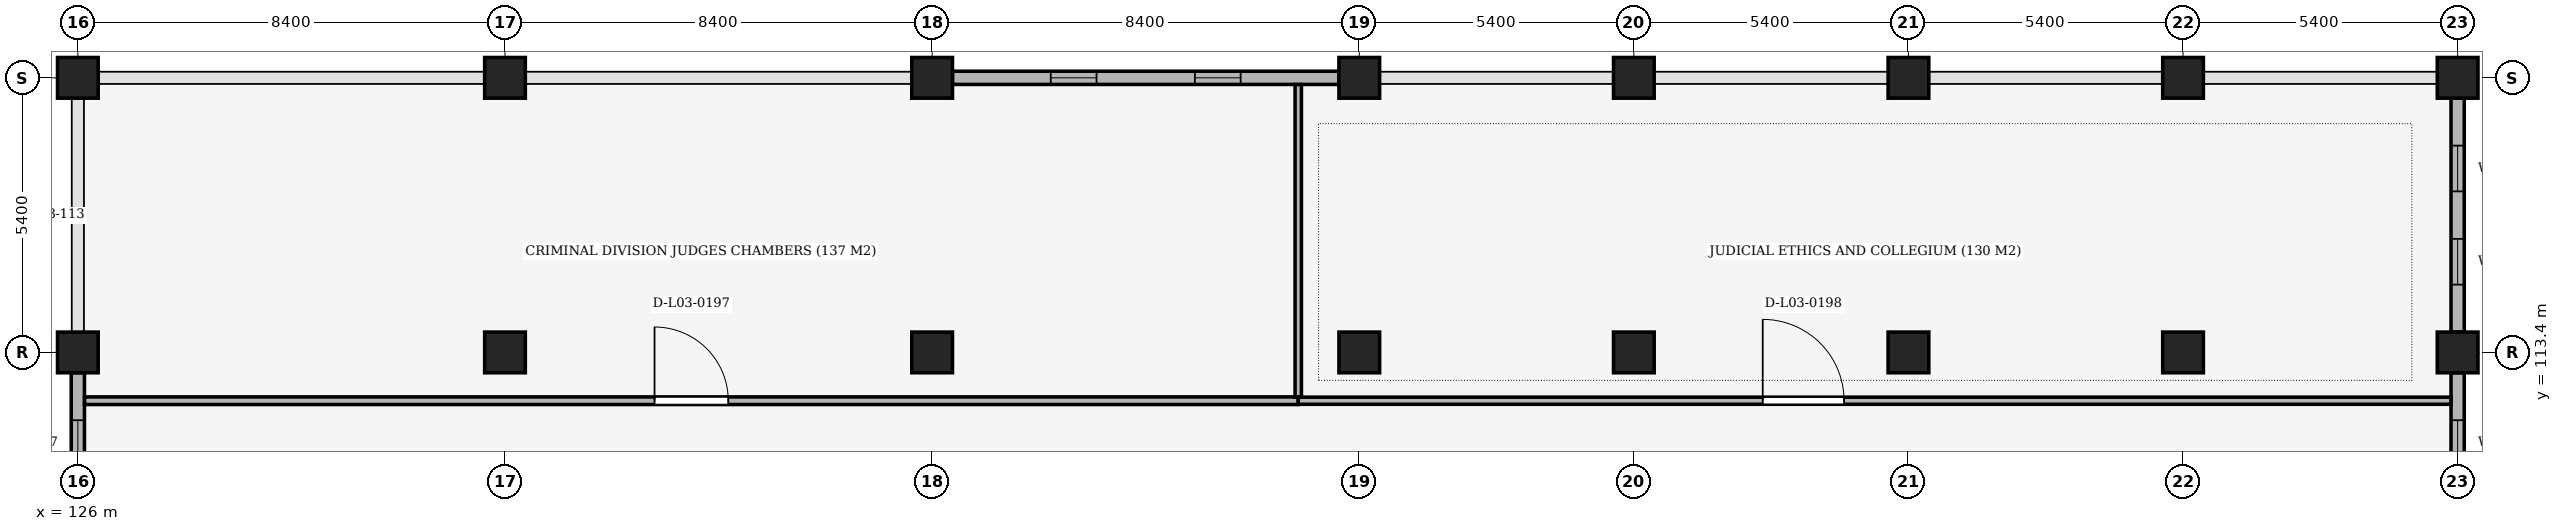
"""IFC4 building model, lengths in metres.
Left out: names, types, materials, properties, quantities, classifications, styles, units other than length and angle.
Written with IfcOpenShell. Run it as: python <this file> out.ifc"""

import sys

from ifc_helpers import new_model, si_unit, direction, frame, frame_2d, origin, origin_2d, place, context, subcontext, project, spatial, rectangle, extrude, element, fill, save


model = new_model("IFC4")
c1 = context("Model", 3, precision=1e-05, world=origin(), true_north=direction((0.0, 1.0)))
c2 = subcontext(c1, "Body", "Model", "MODEL_VIEW")
j1 = project(units=[si_unit("LENGTHUNIT", "METRE"), si_unit("PLANEANGLEUNIT", "RADIAN")], contexts=[c1])
p1 = place(None, origin())
s1 = spatial("IfcSite", under=j1, at=p1, CompositionType="ELEMENT")
p2 = place(p1, origin())
s2 = spatial("IfcBuilding", under=s1, at=p2, CompositionType="ELEMENT")
p3 = place(p2, frame((0.0, 0.0, 15.3)))
s3 = spatial("IfcBuildingStorey", under=s2, at=p3, CompositionType="ELEMENT", Elevation=15.3)
for number, where, z_axis, x_axis in (
    (1, (126.0, 113.4, 0.0), (0.0, 0.0, 1.0), (1.0, 0.0, 0.0)),
    (2, (126.0, 118.8, 0.0), (0.0, 0.0, 1.0), (1.0, 0.0, 0.0)),
    (3, (134.4, 113.4, 0.0), (0.0, 0.0, 1.0), (1.0, 0.0, 0.0)),
    (4, (134.4, 118.8, 0.0), (0.0, 0.0, 1.0), (1.0, 0.0, 0.0)),
    (5, (142.8, 113.4, 0.0), (0.0, 0.0, 1.0), (1.0, 0.0, 0.0)),
    (6, (142.8, 118.8, 0.0), (0.0, 0.0, 1.0), (1.0, 0.0, 0.0)),
    (7, (151.2, 113.4, 0.0), (0.0, 0.0, 1.0), (1.0, 0.0, 0.0)),
    (8, (151.2, 118.8, 0.0), (0.0, 0.0, 1.0), (1.0, 0.0, 0.0)),
    (9, (156.6, 113.4, 0.0), (0.0, 0.0, 1.0), (1.0, 0.0, 0.0)),
    (10, (156.6, 118.8, 0.0), (0.0, 0.0, 1.0), (1.0, 0.0, 0.0)),
    (11, (162.0, 113.4, 0.0), (0.0, 0.0, 1.0), (1.0, 0.0, 0.0)),
    (12, (162.0, 118.8, 0.0), (0.0, 0.0, 1.0), (1.0, 0.0, 0.0)),
    (13, (167.4, 113.4, 0.0), (0.0, 0.0, 1.0), (1.0, 0.0, 0.0)),
    (14, (167.4, 118.8, 0.0), (0.0, 0.0, 1.0), (1.0, 0.0, 0.0)),
    (15, (172.8, 113.4, 0.0), (0.0, 0.0, 1.0), (1.0, 0.0, 0.0)),
    (16, (172.8, 118.8, 0.0), (0.0, 0.0, 1.0), (1.0, 0.0, 0.0)),
):
    element("IfcColumn", number, at=place(p3, frame(where, z_axis=z_axis, x_axis=x_axis)), inside=s3, PredefinedType="COLUMN", context=c2, shape_type="SweptSolid", body=[
        extrude(rectangle(XDim=0.8, YDim=0.8, at=origin_2d()), origin(), (0.0, 0.0, 1.0), 5.1),
    ])
p4 = place(p3, frame((126.0, 108.4, 0.0), z_axis=(0.0, 0.0, 1.0), x_axis=(0.0, 1.0, 0.0)))
e17 = element("IfcWall", 17, at=p4, inside=s3, PredefinedType="SOLIDWALL", context=c2, shape_type="SweptSolid", body=[
    extrude(rectangle(XDim=4.6, YDim=0.26, at=frame_2d((2.3, 0.0))), origin(), (0.0, 0.0, 1.0), 4.29),
])
p5 = place(p4, frame((0.933, 0.0, 0.9)))
e18 = element("IfcOpeningElement", 18, at=p5, cuts=e17, PredefinedType="OPENING", context=c2, shape_type="SweptSolid", body=[
    extrude(rectangle(XDim=0.9, YDim=2.2, at=frame_2d((0.45, 1.1))), frame((0.0, 0.145, 0.0), z_axis=(0.0, -1.0, 0.0), x_axis=(1.0, 0.0, 0.0)), (0.0, 0.0, 1.0), 0.29),
])
p6 = place(p4, frame((2.767, 0.0, 0.9)))
e19 = element("IfcOpeningElement", 19, at=p6, cuts=e17, PredefinedType="OPENING", context=c2, shape_type="SweptSolid", body=[
    extrude(rectangle(XDim=0.9, YDim=2.2, at=frame_2d((0.45, 1.1))), frame((0.0, 0.145, 0.0), z_axis=(0.0, -1.0, 0.0), x_axis=(1.0, 0.0, 0.0)), (0.0, 0.0, 1.0), 0.29),
])
p7 = place(p3, frame((143.2, 118.8, 0.0), z_axis=(0.0, 0.0, 1.0), x_axis=(1.0, 0.0, 0.0)))
e20 = element("IfcWall", 20, at=p7, inside=s3, PredefinedType="SOLIDWALL", context=c2, shape_type="SweptSolid", body=[
    extrude(rectangle(XDim=7.6, YDim=0.26, at=frame_2d((3.8, 0.0))), origin(), (0.0, 0.0, 1.0), 4.14),
])
p8 = place(p7, frame((1.933, 0.0, 0.9)))
e21 = element("IfcOpeningElement", 21, at=p8, cuts=e20, PredefinedType="OPENING", context=c2, shape_type="SweptSolid", body=[
    extrude(rectangle(XDim=0.9, YDim=2.2, at=frame_2d((0.45, 1.1))), frame((0.0, 0.145, 0.0), z_axis=(0.0, -1.0, 0.0), x_axis=(1.0, 0.0, 0.0)), (0.0, 0.0, 1.0), 0.29),
])
p9 = place(p7, frame((4.767, 0.0, 0.9)))
e22 = element("IfcOpeningElement", 22, at=p9, cuts=e20, PredefinedType="OPENING", context=c2, shape_type="SweptSolid", body=[
    extrude(rectangle(XDim=0.9, YDim=2.2, at=frame_2d((0.45, 1.1))), frame((0.0, 0.145, 0.0), z_axis=(0.0, -1.0, 0.0), x_axis=(1.0, 0.0, 0.0)), (0.0, 0.0, 1.0), 0.29),
])
p10 = place(p3, frame((172.8, 118.4, 0.0), z_axis=(0.0, 0.0, 1.0), x_axis=(0.0, -1.0, 0.0)))
e23 = element("IfcWall", 23, at=p10, inside=s3, PredefinedType="SOLIDWALL", context=c2, shape_type="SweptSolid", body=[
    extrude(rectangle(XDim=4.6, YDim=0.26, at=frame_2d((2.3, 0.0))), origin(), (0.0, 0.0, 1.0), 4.29),
])
p11 = place(p10, frame((0.933, 0.0, 0.9)))
e24 = element("IfcOpeningElement", 24, at=p11, cuts=e23, PredefinedType="OPENING", context=c2, shape_type="SweptSolid", body=[
    extrude(rectangle(XDim=0.9, YDim=2.2, at=frame_2d((0.45, 1.1))), frame((0.0, 0.145, 0.0), z_axis=(0.0, -1.0, 0.0), x_axis=(1.0, 0.0, 0.0)), (0.0, 0.0, 1.0), 0.29),
])
p12 = place(p10, frame((2.767, 0.0, 0.9)))
e25 = element("IfcOpeningElement", 25, at=p12, cuts=e23, PredefinedType="OPENING", context=c2, shape_type="SweptSolid", body=[
    extrude(rectangle(XDim=0.9, YDim=2.2, at=frame_2d((0.45, 1.1))), frame((0.0, 0.145, 0.0), z_axis=(0.0, -1.0, 0.0), x_axis=(1.0, 0.0, 0.0)), (0.0, 0.0, 1.0), 0.29),
])
p13 = place(p3, frame((172.8, 113.0, 0.0), z_axis=(0.0, 0.0, 1.0), x_axis=(0.0, -1.0, 0.0)))
e26 = element("IfcWall", 26, at=p13, inside=s3, PredefinedType="SOLIDWALL", context=c2, shape_type="SweptSolid", body=[
    extrude(rectangle(XDim=4.6, YDim=0.26, at=frame_2d((2.3, 0.0))), origin(), (0.0, 0.0, 1.0), 4.29),
])
p14 = place(p13, frame((0.933, 0.0, 0.9)))
e27 = element("IfcOpeningElement", 27, at=p14, cuts=e26, PredefinedType="OPENING", context=c2, shape_type="SweptSolid", body=[
    extrude(rectangle(XDim=0.9, YDim=2.2, at=frame_2d((0.45, 1.1))), frame((0.0, 0.145, 0.0), z_axis=(0.0, -1.0, 0.0), x_axis=(1.0, 0.0, 0.0)), (0.0, 0.0, 1.0), 0.29),
])
p15 = place(p13, frame((2.767, 0.0, 0.9)))
e28 = element("IfcOpeningElement", 28, at=p15, cuts=e26, PredefinedType="OPENING", context=c2, shape_type="SweptSolid", body=[
    extrude(rectangle(XDim=0.9, YDim=2.2, at=frame_2d((0.45, 1.1))), frame((0.0, 0.145, 0.0), z_axis=(0.0, -1.0, 0.0), x_axis=(1.0, 0.0, 0.0)), (0.0, 0.0, 1.0), 0.29),
])
p16 = place(p3, frame((126.132, 112.45, 0.0), z_axis=(0.0, 0.0, 1.0), x_axis=(1.0, 0.0, 0.0)))
e29 = element("IfcWall", 29, at=p16, inside=s3, PredefinedType="PARTITIONING", context=c2, shape_type="SweptSolid", body=[
    extrude(rectangle(XDim=23.868, YDim=0.15, at=frame_2d((11.934, 0.0))), origin(), (0.0, 0.0, 1.0), 4.29),
])
p17 = place(p16, frame((11.209, 0.0, 0.0)))
e30 = element("IfcOpeningElement", 30, at=p17, cuts=e29, PredefinedType="OPENING", context=c2, shape_type="SweptSolid", body=[
    extrude(rectangle(XDim=1.45, YDim=2.25, at=frame_2d((0.725, 1.125))), frame((0.0, 0.09, 0.0), z_axis=(0.0, -1.0, 0.0), x_axis=(1.0, 0.0, 0.0)), (0.0, 0.0, 1.0), 0.18),
])
p18 = place(p3, frame((150.0, 112.45, 0.0), z_axis=(0.0, 0.0, 1.0), x_axis=(1.0, 0.0, 0.0)))
e31 = element("IfcWall", 31, at=p18, inside=s3, PredefinedType="PARTITIONING", context=c2, shape_type="SweptSolid", body=[
    extrude(rectangle(XDim=22.668, YDim=0.14, at=frame_2d((11.334, 0.0))), origin(), (0.0, 0.0, 1.0), 4.29),
])
p19 = place(p18, frame((9.134, 0.0, 0.0)))
e32 = element("IfcOpeningElement", 32, at=p19, cuts=e31, PredefinedType="OPENING", context=c2, shape_type="SweptSolid", body=[
    extrude(rectangle(XDim=1.6, YDim=2.3, at=frame_2d((0.8, 1.15))), frame((0.0, 0.085, 0.0), z_axis=(0.0, -1.0, 0.0), x_axis=(1.0, 0.0, 0.0)), (0.0, 0.0, 1.0), 0.17),
])
p20 = place(p3, frame((150.0, 112.527, 0.0), z_axis=(0.0, 0.0, 1.0), x_axis=(0.0, 1.0, 0.0)))
e33 = element("IfcWall", 33, at=p20, inside=s3, PredefinedType="PARTITIONING", context=c2, shape_type="SweptSolid", body=[
    extrude(rectangle(XDim=6.141, YDim=0.125, at=frame_2d((3.07, 0.0))), origin(), (0.0, 0.0, 1.0), 4.14),
])
p21 = place(p6, origin())
e34 = element("IfcWindow", 34, at=p21, inside=s3, PartitioningType="SINGLE_PANEL", PredefinedType="WINDOW", context=c2, shape_type="SweptSolid", body=[
    extrude(rectangle(XDim=0.9, YDim=2.2, at=frame_2d((0.45, 1.1))), frame((0.0, 0.03, 0.0), z_axis=(0.0, -1.0, 0.0), x_axis=(1.0, 0.0, 0.0)), (0.0, 0.0, 1.0), 0.06),
])
fill(e19, e34)
p22 = place(p8, origin())
e35 = element("IfcWindow", 35, at=p22, inside=s3, PartitioningType="SINGLE_PANEL", PredefinedType="WINDOW", context=c2, shape_type="SweptSolid", body=[
    extrude(rectangle(XDim=0.9, YDim=2.2, at=frame_2d((0.45, 1.1))), frame((0.0, 0.03, 0.0), z_axis=(0.0, -1.0, 0.0), x_axis=(1.0, 0.0, 0.0)), (0.0, 0.0, 1.0), 0.06),
])
fill(e21, e35)
p23 = place(p9, origin())
e36 = element("IfcWindow", 36, at=p23, inside=s3, PartitioningType="SINGLE_PANEL", PredefinedType="WINDOW", context=c2, shape_type="SweptSolid", body=[
    extrude(rectangle(XDim=0.9, YDim=2.2, at=frame_2d((0.45, 1.1))), frame((0.0, 0.03, 0.0), z_axis=(0.0, -1.0, 0.0), x_axis=(1.0, 0.0, 0.0)), (0.0, 0.0, 1.0), 0.06),
])
fill(e22, e36)
p24 = place(p11, origin())
e37 = element("IfcWindow", 37, at=p24, inside=s3, PartitioningType="SINGLE_PANEL", PredefinedType="WINDOW", context=c2, shape_type="SweptSolid", body=[
    extrude(rectangle(XDim=0.9, YDim=2.2, at=frame_2d((0.45, 1.1))), frame((0.0, 0.03, 0.0), z_axis=(0.0, -1.0, 0.0), x_axis=(1.0, 0.0, 0.0)), (0.0, 0.0, 1.0), 0.06),
])
fill(e24, e37)
p25 = place(p12, origin())
e38 = element("IfcWindow", 38, at=p25, inside=s3, PartitioningType="SINGLE_PANEL", PredefinedType="WINDOW", context=c2, shape_type="SweptSolid", body=[
    extrude(rectangle(XDim=0.9, YDim=2.2, at=frame_2d((0.45, 1.1))), frame((0.0, 0.03, 0.0), z_axis=(0.0, -1.0, 0.0), x_axis=(1.0, 0.0, 0.0)), (0.0, 0.0, 1.0), 0.06),
])
fill(e25, e38)
p26 = place(p14, origin())
e39 = element("IfcWindow", 39, at=p26, inside=s3, PartitioningType="SINGLE_PANEL", PredefinedType="WINDOW", context=c2, shape_type="SweptSolid", body=[
    extrude(rectangle(XDim=0.9, YDim=2.2, at=frame_2d((0.45, 1.1))), frame((0.0, 0.03, 0.0), z_axis=(0.0, -1.0, 0.0), x_axis=(1.0, 0.0, 0.0)), (0.0, 0.0, 1.0), 0.06),
])
fill(e27, e39)
p27 = place(p17, origin())
e40 = element("IfcDoor", 40, at=p27, inside=s3, OperationType="SINGLE_SWING_LEFT", PredefinedType="DOOR", context=c2, shape_type="SweptSolid", body=[
    extrude(rectangle(XDim=1.45, YDim=2.25, at=frame_2d((0.725, 1.125))), frame((0.0, 0.025, 0.0), z_axis=(0.0, -1.0, 0.0), x_axis=(1.0, 0.0, 0.0)), (0.0, 0.0, 1.0), 0.05),
])
fill(e30, e40)
p28 = place(p19, origin())
e41 = element("IfcDoor", 41, at=p28, inside=s3, OperationType="SINGLE_SWING_LEFT", PredefinedType="DOOR", context=c2, shape_type="SweptSolid", body=[
    extrude(rectangle(XDim=1.6, YDim=2.3, at=frame_2d((0.8, 1.15))), frame((0.0, 0.025, 0.0), z_axis=(0.0, -1.0, 0.0), x_axis=(1.0, 0.0, 0.0)), (0.0, 0.0, 1.0), 0.05),
])
fill(e32, e41)
save(model, sys.argv[1])
